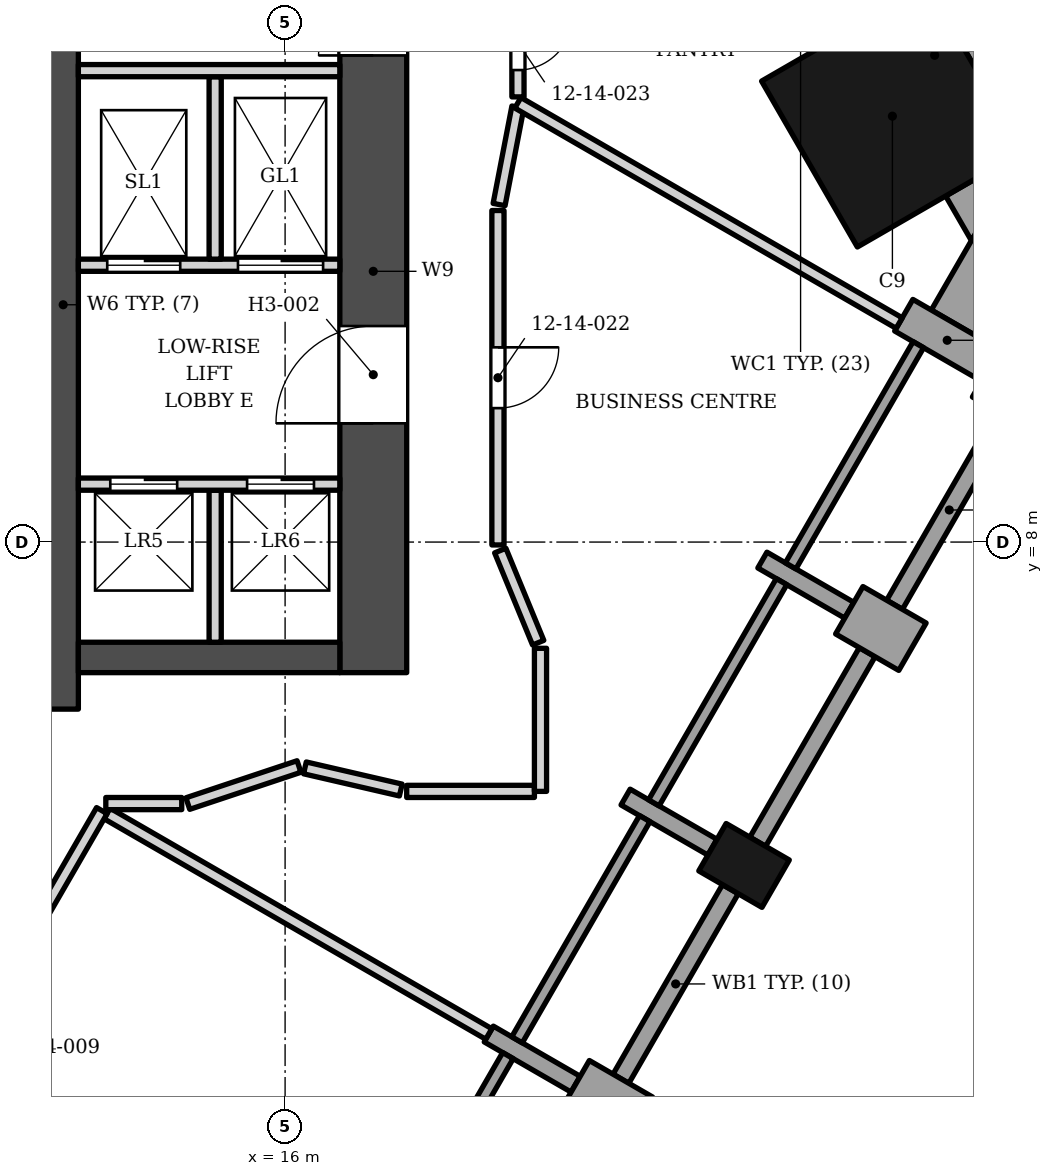
"""IFC4 building model, lengths in metres.
Left out: names, types, materials, properties, quantities, classifications, styles, units other than length and angle.
Written with IfcOpenShell. Run it as: python <this file> out.ifc"""

import sys

from ifc_helpers import new_model, si_unit, direction, frame, frame_2d, origin, origin_2d, place, context, subcontext, project, spatial, polyline, rectangle, outline, extrude, element, fill, save


model = new_model("IFC4")
c1 = context("Model", 3, precision=1e-05, world=origin(), true_north=direction((0.0, 1.0)))
c2 = subcontext(c1, "Body", "Model", "MODEL_VIEW")
j1 = project(units=[si_unit("LENGTHUNIT", "METRE"), si_unit("PLANEANGLEUNIT", "RADIAN")], contexts=[c1])
p1 = place(None, origin())
s1 = spatial("IfcSite", under=j1, at=p1, CompositionType="ELEMENT")
p2 = place(p1, origin())
s2 = spatial("IfcBuilding", under=s1, at=p2, CompositionType="ELEMENT")
p3 = place(p2, frame((0.0, 0.0, 66.4)))
s3 = spatial("IfcBuildingStorey", under=s2, at=p3, CompositionType="ELEMENT", Elevation=66.4)
p4 = place(p3, frame((12.35, 5.253, 0.0), z_axis=(0.0, 0.0, 1.0), x_axis=(0.0, 1.0, 0.0)))
e1 = element("IfcWall", 1, at=p4, inside=s3, PredefinedType="SHEAR", context=c2, shape_type="SweptSolid", body=[
    extrude(rectangle(XDim=13.3, YDim=0.5, at=frame_2d((6.65, 0.0))), origin(), (0.0, 0.0, 1.0), 3.4),
])
p5 = place(p3, frame((12.6, 6.103, 0.0), z_axis=(0.0, 0.0, 1.0), x_axis=(1.0, 0.0, 0.0)))
e2 = element("IfcWall", 2, at=p5, inside=s3, PredefinedType="SHEAR", context=c2, shape_type="SweptSolid", body=[
    extrude(rectangle(XDim=4.3, YDim=0.5, at=frame_2d((2.15, 0.0))), origin(), (0.0, 0.0, 1.0), 3.4),
])
p6 = place(p3, frame((17.45, 5.853, 0.0), z_axis=(0.0, 0.0, 1.0), x_axis=(0.0, 1.0, 0.0)))
e3 = element("IfcWall", 3, at=p6, inside=s3, PredefinedType="SHEAR", context=c2, shape_type="SweptSolid", body=[
    extrude(rectangle(XDim=13.2, YDim=1.1, at=frame_2d((6.6, 0.0))), origin(), (0.0, 0.0, 1.0), 3.4),
])
p7 = place(p6, frame((4.1, 0.0, 0.0)))
e4 = element("IfcOpeningElement", 4, at=p7, cuts=e3, PredefinedType="OPENING", context=c2, shape_type="SweptSolid", body=[
    extrude(rectangle(XDim=1.6, YDim=2.1, at=frame_2d((0.8, 1.05))), frame((0.0, 0.56, 0.0), z_axis=(0.0, -1.0, 0.0), x_axis=(1.0, 0.0, 0.0)), (0.0, 0.0, 1.0), 1.12),
])
p8 = place(p6, frame((10.15, 0.0, 0.0)))
e5 = element("IfcOpeningElement", 5, at=p8, cuts=e3, PredefinedType="OPENING", context=c2, shape_type="SweptSolid", body=[
    extrude(rectangle(XDim=0.9, YDim=2.1, at=frame_2d((0.45, 1.05))), frame((0.0, 0.56, 0.0), z_axis=(0.0, -1.0, 0.0), x_axis=(1.0, 0.0, 0.0)), (0.0, 0.0, 1.0), 1.12),
])
p9 = place(p3, frame((25.988, 15.004, 0.0), z_axis=(0.0, 0.0, 1.0), x_axis=(-0.866025412511, -0.499999984885, 0.0)))
e6 = element("IfcColumn", 6, at=p9, inside=s3, PredefinedType="COLUMN", context=c2, shape_type="SweptSolid", body=[
    extrude(rectangle(XDim=3.15, YDim=3.15, at=origin_2d()), origin(), (0.0, 0.0, 1.0), 3.4),
])
for number, where, z_axis, x_axis in (
    (7, (23.548, 2.682, 0.0), (0.0, 0.0, 1.0), (0.5, 0.866, 0.0)),
    (8, (28.048, 10.476, 0.0), (0.0, 0.0, 1.0), (0.5, 0.866, 0.0)),
):
    element("IfcColumn", number, at=place(p3, frame(where, z_axis=z_axis, x_axis=x_axis)), inside=s3, PredefinedType="COLUMN", context=c2, shape_type="SweptSolid", body=[
        extrude(rectangle(XDim=0.9, YDim=1.2, at=origin_2d()), origin(), (0.0, 0.0, 1.0), 3.4),
    ])
p10 = place(p3, frame((21.818, -1.515, 0.0), z_axis=(0.0, 0.0, 1.0), x_axis=(-0.865955154139, 0.50012165622, 0.0)))
e9 = element("IfcWall", 9, at=p10, inside=s3, PredefinedType="SOLIDWALL", context=c2, shape_type="SweptSolid", body=[
    extrude(rectangle(XDim=1.2, YDim=0.9, at=frame_2d((0.6, 0.0))), origin(), (0.0, 0.0, 1.0), 2.63),
])
p11 = place(p3, frame((19.35, -0.09, 0.0), z_axis=(0.0, 0.0, 1.0), x_axis=(0.866040211805, -0.499974350878, 0.0)))
e10 = element("IfcWall", 10, at=p11, inside=s3, PredefinedType="SOLIDWALL", context=c2, shape_type="SweptSolid", body=[
    extrude(rectangle(XDim=1.65, YDim=0.3, at=frame_2d((0.825, 0.0))), origin(), (0.0, 0.0, 1.0), 2.65),
])
p12 = place(p3, frame((21.6, 3.807, 0.0), z_axis=(0.0, 0.0, 1.0), x_axis=(0.865966208357, -0.500102515474, 0.0)))
e11 = element("IfcWall", 11, at=p12, inside=s3, PredefinedType="SOLIDWALL", context=c2, shape_type="SweptSolid", body=[
    extrude(rectangle(XDim=1.65, YDim=0.3, at=frame_2d((0.825, 0.0))), origin(), (0.0, 0.0, 1.0), 2.45),
])
p13 = place(p3, frame((25.279, 6.879, 0.0), z_axis=(0.0, 0.0, 1.0), x_axis=(0.865955154139, -0.50012165622, 0.0)))
e12 = element("IfcWall", 12, at=p13, inside=s3, PredefinedType="SOLIDWALL", context=c2, shape_type="SweptSolid", body=[
    extrude(rectangle(XDim=1.2, YDim=0.9, at=frame_2d((0.6, 0.0))), origin(), (0.0, 0.0, 1.0), 2.63),
])
p14 = place(p3, frame((23.85, 7.704, 0.0), z_axis=(0.0, 0.0, 1.0), x_axis=(0.866040211805, -0.499974350878, 0.0)))
e13 = element("IfcWall", 13, at=p14, inside=s3, PredefinedType="SOLIDWALL", context=c2, shape_type="SweptSolid", body=[
    extrude(rectangle(XDim=1.65, YDim=0.3, at=frame_2d((0.825, 0.0))), origin(), (0.0, 0.0, 1.0), 2.65),
])
p15 = place(p3, frame((27.604, 10.906, 0.0), z_axis=(0.0, 0.0, 1.0), x_axis=(-0.866040211805, 0.499974350878, 0.0)))
e14 = element("IfcWall", 14, at=p15, inside=s3, PredefinedType="SOLIDWALL", context=c2, shape_type="SweptSolid", body=[
    extrude(rectangle(XDim=1.65, YDim=0.6, at=frame_2d((0.825, 0.0))), origin(), (0.0, 0.0, 1.0), 2.65),
])
p16 = place(p3, frame((17.564, -4.083, 0.0), z_axis=(0.0, 0.0, 1.0), x_axis=(0.500027713859, 0.866009402589, 0.0)))
e15 = element("IfcWall", 15, at=p16, inside=s3, PredefinedType="ELEMENTEDWALL", context=c2, shape_type="SweptSolid", body=[
    extrude(rectangle(XDim=4.2, YDim=0.2, at=frame_2d((2.1, 0.0))), origin(), (0.0, 0.0, 1.0), 2.65),
])
p17 = place(p3, frame((21.523, -0.826, 0.0), z_axis=(0.0, 0.0, 1.0), x_axis=(0.499961193289, 0.866047807691, 0.0)))
e16 = element("IfcWall", 16, at=p17, inside=s3, PredefinedType="SOLIDWALL", context=c2, shape_type="SweptSolid", body=[
    extrude(rectangle(XDim=3.6, YDim=0.3, at=frame_2d((1.8, 0.0))), origin(), (0.0, 0.0, 1.0), 2.63),
])
p18 = place(p3, frame((19.814, -0.186, 0.0), z_axis=(0.0, 0.0, 1.0), x_axis=(0.500002543286, 0.866023935413, 0.0)))
e17 = element("IfcWall", 17, at=p18, inside=s3, PredefinedType="ELEMENTEDWALL", context=c2, shape_type="SweptSolid", body=[
    extrude(rectangle(XDim=4.2, YDim=0.2, at=frame_2d((2.1, 0.0))), origin(), (0.0, 0.0, 1.0), 2.45),
])
p19 = place(p3, frame((23.773, 3.072, 0.0), z_axis=(0.0, 0.0, 1.0), x_axis=(0.499961193289, 0.866047807691, 0.0)))
e18 = element("IfcWall", 18, at=p19, inside=s3, PredefinedType="SOLIDWALL", context=c2, shape_type="SweptSolid", body=[
    extrude(rectangle(XDim=3.6, YDim=0.3, at=frame_2d((1.8, 0.0))), origin(), (0.0, 0.0, 1.0), 2.63),
])
p20 = place(p3, frame((22.064, 3.712, 0.0), z_axis=(0.0, 0.0, 1.0), x_axis=(0.500027713859, 0.866009402589, 0.0)))
e19 = element("IfcWall", 19, at=p20, inside=s3, PredefinedType="ELEMENTEDWALL", context=c2, shape_type="SweptSolid", body=[
    extrude(rectangle(XDim=4.2, YDim=0.2, at=frame_2d((2.1, 0.0))), origin(), (0.0, 0.0, 1.0), 2.65),
])
p21 = place(p3, frame((26.023, 6.969, 0.0), z_axis=(0.0, 0.0, 1.0), x_axis=(0.499961193289, 0.866047807691, 0.0)))
e20 = element("IfcWall", 20, at=p21, inside=s3, PredefinedType="SOLIDWALL", context=c2, shape_type="SweptSolid", body=[
    extrude(rectangle(XDim=3.6, YDim=0.3, at=frame_2d((1.8, 0.0))), origin(), (0.0, 0.0, 1.0), 2.63),
])
p22 = place(p3, frame((24.314, 7.609, 0.0), z_axis=(0.0, 0.0, 1.0), x_axis=(0.500027713859, 0.866009402589, 0.0)))
e21 = element("IfcWall", 21, at=p22, inside=s3, PredefinedType="ELEMENTEDWALL", context=c2, shape_type="SweptSolid", body=[
    extrude(rectangle(XDim=4.2, YDim=0.2, at=frame_2d((2.1, 0.0))), origin(), (0.0, 0.0, 1.0), 2.65),
])
p23 = place(p3, origin())
e22 = element("IfcWall", 22, at=p23, inside=s3, PredefinedType="SOLIDWALL", context=c2, shape_type="SweptSolid", body=[
    extrude(outline(polyline([(30.001, 12.658), (28.662, 13.431), (28.552, 13.367), (28.443, 13.558), (27.836, 13.908), (26.628, 11.816), (28.793, 10.566), (30.001, 12.658)])), origin(), (0.0, 0.0, 1.0), 2.63),
])
p24 = place(p3, origin())
e23 = element("IfcWall", 23, at=p24, inside=s3, PredefinedType="SOLIDWALL", context=c2, shape_type="SweptSolid", body=[
    extrude(outline(polyline([(25.852, 18.044), (26.891, 18.644), (26.482, 19.353), (24.778, 18.369), (24.778, 17.304), (25.289, 16.419), (26.564, 17.156), (28.139, 14.427), (26.864, 13.691), (27.287, 12.958), (27.836, 13.908), (28.443, 13.558), (28.102, 14.147), (29.141, 14.747), (27.341, 17.864), (26.302, 17.264), (25.852, 18.044)])), origin(), (0.0, 0.0, 1.0), 2.63),
])
p25 = place(p3, frame((14.85, 6.353, 0.0), z_axis=(0.0, 0.0, 1.0), x_axis=(0.0, 1.0, 0.0)))
e24 = element("IfcWall", 24, at=p25, inside=s3, PredefinedType="SOLIDWALL", context=c2, shape_type="SweptSolid", body=[
    extrude(rectangle(XDim=2.5, YDim=0.2, at=frame_2d((1.25, 0.0))), origin(), (0.0, 0.0, 1.0), 3.23),
])
p26 = place(p3, frame((12.6, 8.953, 0.0), z_axis=(0.0, 0.0, 1.0), x_axis=(1.0, 0.0, 0.0)))
e25 = element("IfcWall", 25, at=p26, inside=s3, PredefinedType="SOLIDWALL", context=c2, shape_type="SweptSolid", body=[
    extrude(rectangle(XDim=4.3, YDim=0.2, at=frame_2d((2.15, 0.0))), origin(), (0.0, 0.0, 1.0), 3.23),
])
p27 = place(p26, frame((0.525, 0.0, 0.0)))
e26 = element("IfcOpeningElement", 26, at=p27, cuts=e25, PredefinedType="OPENING", context=c2, shape_type="SweptSolid", body=[
    extrude(rectangle(XDim=1.1, YDim=2.1, at=frame_2d((0.55, 1.05))), frame((0.0, 0.11, 0.0), z_axis=(0.0, -1.0, 0.0), x_axis=(1.0, 0.0, 0.0)), (0.0, 0.0, 1.0), 0.22),
])
p28 = place(p26, frame((2.775, 0.0, 0.0)))
e27 = element("IfcOpeningElement", 27, at=p28, cuts=e25, PredefinedType="OPENING", context=c2, shape_type="SweptSolid", body=[
    extrude(rectangle(XDim=1.1, YDim=2.1, at=frame_2d((0.55, 1.05))), frame((0.0, 0.11, 0.0), z_axis=(0.0, -1.0, 0.0), x_axis=(1.0, 0.0, 0.0)), (0.0, 0.0, 1.0), 0.22),
])
p29 = place(p3, frame((12.6, 12.552, 0.0), z_axis=(0.0, 0.0, 1.0), x_axis=(1.0, 0.0, 0.0)))
e28 = element("IfcWall", 28, at=p29, inside=s3, PredefinedType="SOLIDWALL", context=c2, shape_type="SweptSolid", body=[
    extrude(rectangle(XDim=4.3, YDim=0.2, at=frame_2d((2.15, 0.0))), origin(), (0.0, 0.0, 1.0), 3.23),
])
p30 = place(p29, frame((0.475, 0.0, 0.0)))
e29 = element("IfcOpeningElement", 29, at=p30, cuts=e28, PredefinedType="OPENING", context=c2, shape_type="SweptSolid", body=[
    extrude(rectangle(XDim=1.2, YDim=2.1, at=frame_2d((0.6, 1.05))), frame((0.0, 0.11, 0.0), z_axis=(0.0, -1.0, 0.0), x_axis=(1.0, 0.0, 0.0)), (0.0, 0.0, 1.0), 0.22),
])
p31 = place(p29, frame((2.625, 0.0, 0.0)))
e30 = element("IfcOpeningElement", 30, at=p31, cuts=e28, PredefinedType="OPENING", context=c2, shape_type="SweptSolid", body=[
    extrude(rectangle(XDim=1.4, YDim=2.1, at=frame_2d((0.7, 1.05))), frame((0.0, 0.11, 0.0), z_axis=(0.0, -1.0, 0.0), x_axis=(1.0, 0.0, 0.0)), (0.0, 0.0, 1.0), 0.22),
])
p32 = place(p3, frame((14.85, 12.653, 0.0), z_axis=(0.0, 0.0, 1.0), x_axis=(0.0, 1.0, 0.0)))
e31 = element("IfcWall", 31, at=p32, inside=s3, PredefinedType="SOLIDWALL", context=c2, shape_type="SweptSolid", body=[
    extrude(rectangle(XDim=3.0, YDim=0.2, at=frame_2d((1.5, 0.0))), origin(), (0.0, 0.0, 1.0), 3.23),
])
p33 = place(p3, frame((12.6, 15.753, 0.0), z_axis=(0.0, 0.0, 1.0), x_axis=(1.0, 0.0, 0.0)))
e32 = element("IfcWall", 32, at=p33, inside=s3, PredefinedType="SOLIDWALL", context=c2, shape_type="SweptSolid", body=[
    extrude(rectangle(XDim=4.3, YDim=0.2, at=frame_2d((2.15, 0.0))), origin(), (0.0, 0.0, 1.0), 3.23),
])
p34 = place(p3, frame((13.073, 3.536, 0.0), z_axis=(0.0, 0.0, 1.0), x_axis=(0.865929252606, -0.500166501758, 0.0)))
e33 = element("IfcWall", 33, at=p34, inside=s3, PredefinedType="PARTITIONING", context=c2, shape_type="SweptSolid", body=[
    extrude(rectangle(XDim=7.25, YDim=0.2, at=frame_2d((3.625, 0.0))), origin(), (0.0, 0.0, 1.0), 2.384),
])
p35 = place(p3, frame((2.686, -14.257, 0.0), z_axis=(0.0, 0.0, 1.0), x_axis=(0.49998850195, 0.866032042085, 0.0)))
e34 = element("IfcWall", 34, at=p35, inside=s3, PredefinedType="PARTITIONING", context=c2, shape_type="SweptSolid", body=[
    extrude(rectangle(XDim=20.6, YDim=0.2, at=frame_2d((10.3, 0.0))), origin(), (0.0, 0.0, 1.0), 2.302),
])
p36 = place(p35, frame((9.7, 0.0, 0.0)))
e35 = element("IfcOpeningElement", 35, at=p36, cuts=e34, PredefinedType="OPENING", context=c2, shape_type="SweptSolid", body=[
    extrude(rectangle(XDim=1.1, YDim=2.1, at=frame_2d((0.55, 1.05))), frame((0.0, 0.11, 0.0), z_axis=(0.0, -1.0, 0.0), x_axis=(1.0, 0.0, 0.0)), (0.0, 0.0, 1.0), 0.22),
])
p37 = place(p35, frame((15.6, 0.0, 0.0)))
e36 = element("IfcOpeningElement", 36, at=p37, cuts=e34, PredefinedType="OPENING", context=c2, shape_type="SweptSolid", body=[
    extrude(rectangle(XDim=1.0, YDim=2.1, at=frame_2d((0.5, 1.05))), frame((0.0, 0.11, 0.0), z_axis=(0.0, -1.0, 0.0), x_axis=(1.0, 0.0, 0.0)), (0.0, 0.0, 1.0), 0.22),
])
p38 = place(p3, frame((13.052, 3.699, 0.0), z_axis=(0.0, 0.0, 1.0), x_axis=(1.0, 0.0, 0.0)))
e37 = element("IfcWall", 37, at=p38, inside=s3, PredefinedType="PARTITIONING", context=c2, shape_type="SweptSolid", body=[
    extrude(rectangle(XDim=1.249, YDim=0.2, at=frame_2d((0.624, 0.0))), origin(), (0.0, 0.0, 1.0), 2.384),
])
p39 = place(p3, frame((18.0, 3.899, 0.0), z_axis=(0.0, 0.0, 1.0), x_axis=(0.999999972977, 0.000232477037, 0.0)))
e38 = element("IfcWall", 38, at=p39, inside=s3, PredefinedType="PARTITIONING", context=c2, shape_type="SweptSolid", body=[
    extrude(rectangle(XDim=2.1, YDim=0.2, at=frame_2d((1.05, 0.0))), origin(), (0.0, 0.0, 1.0), 3.23),
])
p40 = place(p3, frame((16.326, 4.287, 0.0), z_axis=(0.0, 0.0, 1.0), x_axis=(0.974302124523, -0.225245133464, 0.0)))
e39 = element("IfcWall", 39, at=p40, inside=s3, PredefinedType="PARTITIONING", context=c2, shape_type="SweptSolid", body=[
    extrude(rectangle(XDim=1.618, YDim=0.2, at=frame_2d((0.809, 0.0))), origin(), (0.0, 0.0, 1.0), 2.45),
])
p41 = place(p3, frame((14.4, 3.699, 0.0), z_axis=(0.0, 0.0, 1.0), x_axis=(0.948657960303, 0.316303769112, 0.0)))
e40 = element("IfcWall", 40, at=p41, inside=s3, PredefinedType="PARTITIONING", context=c2, shape_type="SweptSolid", body=[
    extrude(rectangle(XDim=1.927, YDim=0.2, at=frame_2d((0.964, 0.0))), origin(), (0.0, 0.0, 1.0), 3.23),
])
p42 = place(p3, frame((20.2, 3.9, 0.0), z_axis=(0.0, 0.0, 1.0), x_axis=(0.0, 1.0, 0.0)))
e41 = element("IfcWall", 41, at=p42, inside=s3, PredefinedType="PARTITIONING", context=c2, shape_type="SweptSolid", body=[
    extrude(rectangle(XDim=2.353, YDim=0.2, at=frame_2d((1.176, 0.0))), origin(), (0.0, 0.0, 1.0), 2.45),
])
p43 = place(p3, frame((19.539, 7.86, 0.0), z_axis=(0.0, 0.0, 1.0), x_axis=(0.380749805254, -0.924678098475, 0.0)))
e42 = element("IfcWall", 42, at=p43, inside=s3, PredefinedType="PARTITIONING", context=c2, shape_type="SweptSolid", body=[
    extrude(rectangle(XDim=1.638, YDim=0.2, at=frame_2d((0.819, 0.0))), origin(), (0.0, 0.0, 1.0), 3.23),
])
p44 = place(p3, frame((19.5, 7.953, 0.0), z_axis=(0.0, 0.0, 1.0), x_axis=(0.0, 1.0, 0.0)))
e43 = element("IfcWall", 43, at=p44, inside=s3, PredefinedType="PARTITIONING", context=c2, shape_type="SweptSolid", body=[
    extrude(rectangle(XDim=5.5, YDim=0.2, at=frame_2d((2.75, 0.0))), origin(), (0.0, 0.0, 1.0), 3.23),
])
p45 = place(p44, frame((2.25, 0.0, 0.0)))
e44 = element("IfcOpeningElement", 44, at=p45, cuts=e43, PredefinedType="OPENING", context=c2, shape_type="SweptSolid", body=[
    extrude(rectangle(XDim=1.0, YDim=2.1, at=frame_2d((0.5, 1.05))), frame((0.0, 0.11, 0.0), z_axis=(0.0, -1.0, 0.0), x_axis=(1.0, 0.0, 0.0)), (0.0, 0.0, 1.0), 0.22),
])
p46 = place(p3, frame((19.519, 13.551, 0.0), z_axis=(0.0, 0.0, 1.0), x_axis=(0.18946348331, 0.981887767768, 0.0)))
e45 = element("IfcWall", 45, at=p46, inside=s3, PredefinedType="PARTITIONING", context=c2, shape_type="SweptSolid", body=[
    extrude(rectangle(XDim=1.631, YDim=0.2, at=frame_2d((0.816, 0.0))), origin(), (0.0, 0.0, 1.0), 3.23),
])
p47 = place(p3, frame((19.829, 15.224, 0.0), z_axis=(0.0, 0.0, 1.0), x_axis=(0.865914392541, -0.50019222784, 0.0)))
e46 = element("IfcWall", 46, at=p47, inside=s3, PredefinedType="PARTITIONING", context=c2, shape_type="SweptSolid", body=[
    extrude(rectangle(XDim=7.242, YDim=0.2, at=frame_2d((3.621, 0.0))), origin(), (0.0, 0.0, 1.0), 3.23),
])
p48 = place(p3, frame((19.828, 16.802, 0.0), z_axis=(0.0, 0.0, 1.0), x_axis=(0.000988793188, -0.999999511144, 0.0)))
e47 = element("IfcWall", 47, at=p48, inside=s3, PredefinedType="PARTITIONING", context=c2, shape_type="SweptSolid", body=[
    extrude(rectangle(XDim=1.481, YDim=0.2, at=frame_2d((0.741, 0.0))), origin(), (0.0, 0.0, 1.0), 3.23),
])
p49 = place(p48, frame((0.14, 0.0, 0.0)))
e48 = element("IfcOpeningElement", 48, at=p49, cuts=e47, PredefinedType="OPENING", context=c2, shape_type="SweptSolid", body=[
    extrude(rectangle(XDim=0.9, YDim=2.1, at=frame_2d((0.45, 1.05))), frame((0.0, 0.11, 0.0), z_axis=(0.0, -1.0, 0.0), x_axis=(1.0, 0.0, 0.0)), (0.0, 0.0, 1.0), 0.22),
])
p50 = place(p27, origin())
e49 = element("IfcDoor", 49, at=p50, inside=s3, OperationType="DOUBLE_DOOR_SLIDING", PredefinedType="DOOR", context=c2, shape_type="SweptSolid", body=[
    extrude(rectangle(XDim=1.1, YDim=2.1, at=frame_2d((0.55, 1.05))), frame((0.0, 0.025, 0.0), z_axis=(0.0, -1.0, 0.0), x_axis=(1.0, 0.0, 0.0)), (0.0, 0.0, 1.0), 0.05),
])
fill(e26, e49)
p51 = place(p28, origin())
e50 = element("IfcDoor", 50, at=p51, inside=s3, OperationType="DOUBLE_DOOR_SLIDING", PredefinedType="DOOR", context=c2, shape_type="SweptSolid", body=[
    extrude(rectangle(XDim=1.1, YDim=2.1, at=frame_2d((0.55, 1.05))), frame((0.0, 0.025, 0.0), z_axis=(0.0, -1.0, 0.0), x_axis=(1.0, 0.0, 0.0)), (0.0, 0.0, 1.0), 0.05),
])
fill(e27, e50)
p52 = place(p30, origin())
e51 = element("IfcDoor", 51, at=p52, inside=s3, OperationType="DOUBLE_DOOR_SLIDING", PredefinedType="DOOR", context=c2, shape_type="SweptSolid", body=[
    extrude(rectangle(XDim=1.2, YDim=2.1, at=frame_2d((0.6, 1.05))), frame((0.0, 0.025, 0.0), z_axis=(0.0, -1.0, 0.0), x_axis=(1.0, 0.0, 0.0)), (0.0, 0.0, 1.0), 0.05),
])
fill(e29, e51)
p53 = place(p31, origin())
e52 = element("IfcDoor", 52, at=p53, inside=s3, OperationType="DOUBLE_DOOR_SLIDING", PredefinedType="DOOR", context=c2, shape_type="SweptSolid", body=[
    extrude(rectangle(XDim=1.4, YDim=2.1, at=frame_2d((0.7, 1.05))), frame((0.0, 0.025, 0.0), z_axis=(0.0, -1.0, 0.0), x_axis=(1.0, 0.0, 0.0)), (0.0, 0.0, 1.0), 0.05),
])
fill(e30, e52)
p54 = place(p7, origin())
e53 = element("IfcDoor", 53, at=p54, inside=s3, OperationType="DOUBLE_DOOR_SINGLE_SWING", PredefinedType="DOOR", context=c2, shape_type="SweptSolid", body=[
    extrude(rectangle(XDim=1.6, YDim=2.1, at=frame_2d((0.8, 1.05))), frame((0.0, 0.275, 0.0), z_axis=(0.0, -1.0, 0.0), x_axis=(1.0, 0.0, 0.0)), (0.0, 0.0, 1.0), 0.05),
])
fill(e4, e53)
p55 = place(p8, origin())
e54 = element("IfcDoor", 54, at=p55, inside=s3, OperationType="SINGLE_SWING_LEFT", PredefinedType="DOOR", context=c2, shape_type="SweptSolid", body=[
    extrude(rectangle(XDim=0.9, YDim=2.1, at=frame_2d((0.45, 1.05))), frame((0.0, 0.275, 0.0), z_axis=(0.0, -1.0, 0.0), x_axis=(1.0, 0.0, 0.0)), (0.0, 0.0, 1.0), 0.05),
])
fill(e5, e54)
p56 = place(p45, origin())
e55 = element("IfcDoor", 55, at=p56, inside=s3, OperationType="SINGLE_SWING_RIGHT", PredefinedType="DOOR", context=c2, shape_type="SweptSolid", body=[
    extrude(rectangle(XDim=1.0, YDim=2.1, at=frame_2d((0.5, 1.05))), frame((0.0, 0.025, 0.0), z_axis=(0.0, -1.0, 0.0), x_axis=(1.0, 0.0, 0.0)), (0.0, 0.0, 1.0), 0.05),
])
fill(e44, e55)
p57 = place(p49, origin())
e56 = element("IfcDoor", 56, at=p57, inside=s3, OperationType="SINGLE_SWING_LEFT", PredefinedType="DOOR", context=c2, shape_type="SweptSolid", body=[
    extrude(rectangle(XDim=0.9, YDim=2.1, at=frame_2d((0.45, 1.05))), frame((0.0, 0.025, 0.0), z_axis=(0.0, -1.0, 0.0), x_axis=(1.0, 0.0, 0.0)), (0.0, 0.0, 1.0), 0.05),
])
fill(e48, e56)
save(model, sys.argv[1])
